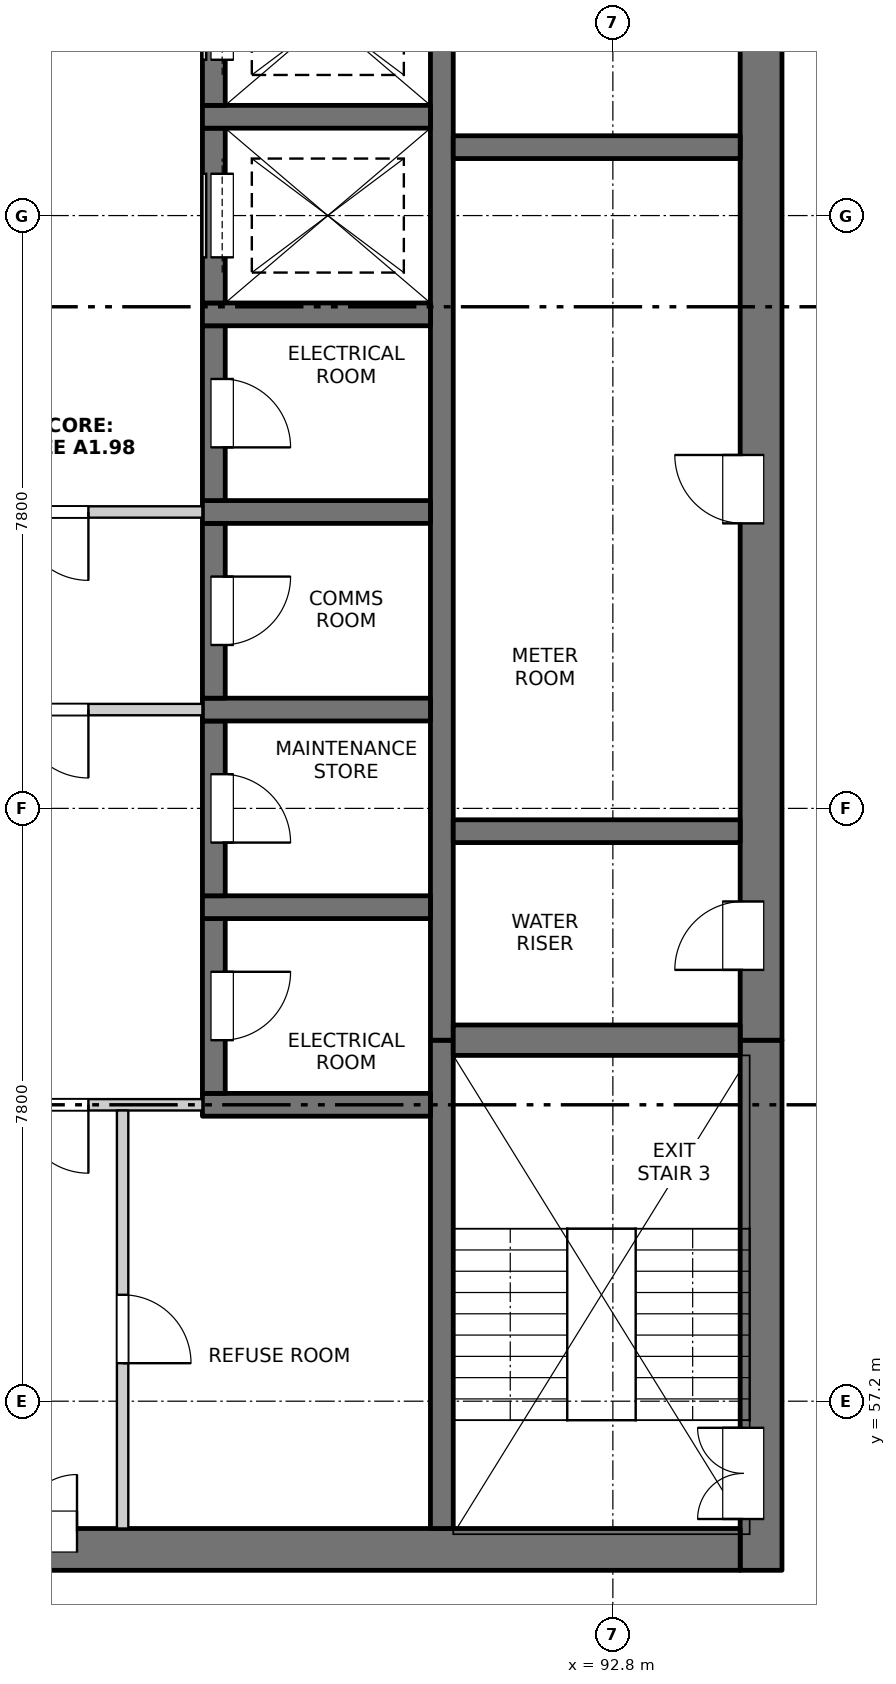
"""IFC4 building model, lengths in metres.
Left out: names, types, materials, properties, quantities, classifications, styles, units other than length and angle.
Written with IfcOpenShell. Run it as: python <this file> out.ifc"""

import sys

from ifc_helpers import new_model, si_unit, direction, frame, frame_2d, origin, place, context, subcontext, project, spatial, rectangle, extrude, element, fill, save


model = new_model("IFC4")
c1 = context("Model", 3, precision=1e-05, world=origin(), true_north=direction((0.0, 1.0)))
c2 = subcontext(c1, "Body", "Model", "MODEL_VIEW")
j1 = project(units=[si_unit("LENGTHUNIT", "METRE"), si_unit("PLANEANGLEUNIT", "RADIAN")], contexts=[c1])
p1 = place(None, origin())
s1 = spatial("IfcSite", under=j1, at=p1, CompositionType="ELEMENT")
p2 = place(p1, origin())
s2 = spatial("IfcBuilding", under=s1, at=p2, CompositionType="ELEMENT")
p3 = place(p2, frame((0.0, 0.0, 186.0)))
s3 = spatial("IfcBuildingStorey", under=s2, at=p3, CompositionType="ELEMENT", Elevation=186.0)
p4 = place(p3, frame((94.75, 54.975, -0.25), z_axis=(0.0, 0.0, 1.0), x_axis=(0.0, 1.0, 0.0)))
e1 = element("IfcWall", 1, at=p4, inside=s3, PredefinedType="SOLIDWALL", context=c2, shape_type="SweptSolid", body=[
    extrude(rectangle(XDim=6.975, YDim=0.55, at=frame_2d((3.487, 0.0))), origin(), (0.0, 0.0, 1.0), 3.4),
])
p5 = place(p4, frame((0.675, 0.0, 0.25)))
e2 = element("IfcOpeningElement", 2, at=p5, cuts=e1, PredefinedType="OPENING", context=c2, shape_type="SweptSolid", body=[
    extrude(rectangle(XDim=1.2, YDim=2.1, at=frame_2d((0.6, 1.05))), frame((0.0, 0.285, 0.0), z_axis=(0.0, -1.0, 0.0), x_axis=(1.0, 0.0, 0.0)), (0.0, 0.0, 1.0), 0.57),
])
p6 = place(p3, frame((94.75, 61.95, -0.25), z_axis=(0.0, 0.0, 1.0), x_axis=(0.0, 1.0, 0.0)))
e3 = element("IfcWall", 3, at=p6, inside=s3, PredefinedType="SOLIDWALL", context=c2, shape_type="SweptSolid", body=[
    extrude(rectangle(XDim=15.35, YDim=0.55, at=frame_2d((7.675, 0.0))), origin(), (0.0, 0.0, 1.0), 3.4),
])
p7 = place(p6, frame((0.925, 0.0, 0.25)))
e4 = element("IfcOpeningElement", 4, at=p7, cuts=e3, PredefinedType="OPENING", context=c2, shape_type="SweptSolid", body=[
    extrude(rectangle(XDim=0.9, YDim=2.1, at=frame_2d((0.45, 1.05))), frame((0.0, 0.285, 0.0), z_axis=(0.0, -1.0, 0.0), x_axis=(1.0, 0.0, 0.0)), (0.0, 0.0, 1.0), 0.57),
])
p8 = place(p6, frame((6.8, 0.0, 0.25)))
e5 = element("IfcOpeningElement", 5, at=p8, cuts=e3, PredefinedType="OPENING", context=c2, shape_type="SweptSolid", body=[
    extrude(rectangle(XDim=0.9, YDim=2.1, at=frame_2d((0.45, 1.05))), frame((0.0, 0.285, 0.0), z_axis=(0.0, -1.0, 0.0), x_axis=(1.0, 0.0, 0.0)), (0.0, 0.0, 1.0), 0.57),
])
p9 = place(p6, frame((13.1, 0.0, 0.25)))
e6 = element("IfcOpeningElement", 6, at=p9, cuts=e3, PredefinedType="OPENING", context=c2, shape_type="SweptSolid", body=[
    extrude(rectangle(XDim=0.9, YDim=2.1, at=frame_2d((0.45, 1.05))), frame((0.0, 0.285, 0.0), z_axis=(0.0, -1.0, 0.0), x_axis=(1.0, 0.0, 0.0)), (0.0, 0.0, 1.0), 0.57),
])
p10 = place(p3, frame((75.525, 55.25, -0.25), z_axis=(0.0, 0.0, 1.0), x_axis=(1.0, 0.0, 0.0)))
e7 = element("IfcWall", 7, at=p10, inside=s3, PredefinedType="SOLIDWALL", context=c2, shape_type="SweptSolid", body=[
    extrude(rectangle(XDim=18.95, YDim=0.55, at=frame_2d((9.475, 0.0))), origin(), (0.0, 0.0, 1.0), 3.4),
])
p11 = place(p10, frame((8.725, 0.0, 0.25)))
e8 = element("IfcOpeningElement", 8, at=p11, cuts=e7, PredefinedType="OPENING", context=c2, shape_type="SweptSolid", body=[
    extrude(rectangle(XDim=1.5, YDim=2.1, at=frame_2d((0.75, 1.05))), frame((0.0, 0.285, 0.0), z_axis=(0.0, -1.0, 0.0), x_axis=(1.0, 0.0, 0.0)), (0.0, 0.0, 1.0), 0.57),
])
p12 = place(p3, frame((90.55, 55.525, -0.25), z_axis=(0.0, 0.0, 1.0), x_axis=(0.0, 1.0, 0.0)))
e9 = element("IfcWall", 9, at=p12, inside=s3, PredefinedType="SOLIDWALL", context=c2, shape_type="SweptSolid", body=[
    extrude(rectangle(XDim=6.425, YDim=0.3, at=frame_2d((3.212, 0.0))), origin(), (0.0, 0.0, 1.0), 3.4),
])
p13 = place(p3, frame((90.55, 61.95, -0.25), z_axis=(0.0, 0.0, 1.0), x_axis=(0.0, 1.0, 0.0)))
e10 = element("IfcWall", 10, at=p13, inside=s3, PredefinedType="SOLIDWALL", context=c2, shape_type="SweptSolid", body=[
    extrude(rectangle(XDim=15.35, YDim=0.3, at=frame_2d((7.675, 0.0))), origin(), (0.0, 0.0, 1.0), 3.4),
])
p14 = place(p3, frame((87.4, 61.1, -0.25), z_axis=(0.0, 0.0, 1.0), x_axis=(1.0, 0.0, 0.0)))
e11 = element("IfcWall", 11, at=p14, inside=s3, PredefinedType="SOLIDWALL", context=c2, shape_type="SweptSolid", body=[
    extrude(rectangle(XDim=3.0, YDim=0.3, at=frame_2d((1.5, 0.0))), origin(), (0.0, 0.0, 1.0), 3.4),
])
p15 = place(p3, frame((87.55, 61.25, -0.25), z_axis=(0.0, 0.0, 1.0), x_axis=(0.0, 1.0, 0.0)))
e12 = element("IfcWall", 12, at=p15, inside=s3, PredefinedType="SOLIDWALL", context=c2, shape_type="SweptSolid", body=[
    extrude(rectangle(XDim=2.3, YDim=0.3, at=frame_2d((1.15, 0.0))), origin(), (0.0, 0.0, 1.0), 3.4),
])
p16 = place(p15, frame((0.7, 0.0, 0.25)))
e13 = element("IfcOpeningElement", 13, at=p16, cuts=e12, PredefinedType="OPENING", context=c2, shape_type="SweptSolid", body=[
    extrude(rectangle(XDim=0.9, YDim=2.1, at=frame_2d((0.45, 1.05))), frame((0.0, 0.16, 0.0), z_axis=(0.0, -1.0, 0.0), x_axis=(1.0, 0.0, 0.0)), (0.0, 0.0, 1.0), 0.32),
])
p17 = place(p3, frame((87.4, 63.7, -0.25), z_axis=(0.0, 0.0, 1.0), x_axis=(1.0, 0.0, 0.0)))
e14 = element("IfcWall", 14, at=p17, inside=s3, PredefinedType="SOLIDWALL", context=c2, shape_type="SweptSolid", body=[
    extrude(rectangle(XDim=3.0, YDim=0.3, at=frame_2d((1.5, 0.0))), origin(), (0.0, 0.0, 1.0), 3.4),
])
p18 = place(p3, frame((87.55, 63.85, -0.25), z_axis=(0.0, 0.0, 1.0), x_axis=(0.0, 1.0, 0.0)))
e15 = element("IfcWall", 15, at=p18, inside=s3, PredefinedType="SOLIDWALL", context=c2, shape_type="SweptSolid", body=[
    extrude(rectangle(XDim=2.3, YDim=0.3, at=frame_2d((1.15, 0.0))), origin(), (0.0, 0.0, 1.0), 3.4),
])
p19 = place(p18, frame((0.7, 0.0, 0.25)))
e16 = element("IfcOpeningElement", 16, at=p19, cuts=e15, PredefinedType="OPENING", context=c2, shape_type="SweptSolid", body=[
    extrude(rectangle(XDim=0.9, YDim=2.1, at=frame_2d((0.45, 1.05))), frame((0.0, 0.16, 0.0), z_axis=(0.0, -1.0, 0.0), x_axis=(1.0, 0.0, 0.0)), (0.0, 0.0, 1.0), 0.32),
])
p20 = place(p3, frame((87.4, 66.3, -0.25), z_axis=(0.0, 0.0, 1.0), x_axis=(1.0, 0.0, 0.0)))
e17 = element("IfcWall", 17, at=p20, inside=s3, PredefinedType="SOLIDWALL", context=c2, shape_type="SweptSolid", body=[
    extrude(rectangle(XDim=3.0, YDim=0.3, at=frame_2d((1.5, 0.0))), origin(), (0.0, 0.0, 1.0), 3.4),
])
p21 = place(p3, frame((87.55, 66.45, -0.25), z_axis=(0.0, 0.0, 1.0), x_axis=(0.0, 1.0, 0.0)))
e18 = element("IfcWall", 18, at=p21, inside=s3, PredefinedType="SOLIDWALL", context=c2, shape_type="SweptSolid", body=[
    extrude(rectangle(XDim=2.3, YDim=0.3, at=frame_2d((1.15, 0.0))), origin(), (0.0, 0.0, 1.0), 3.4),
])
p22 = place(p21, frame((0.7, 0.0, 0.25)))
e19 = element("IfcOpeningElement", 19, at=p22, cuts=e18, PredefinedType="OPENING", context=c2, shape_type="SweptSolid", body=[
    extrude(rectangle(XDim=0.9, YDim=2.1, at=frame_2d((0.45, 1.05))), frame((0.0, 0.16, 0.0), z_axis=(0.0, -1.0, 0.0), x_axis=(1.0, 0.0, 0.0)), (0.0, 0.0, 1.0), 0.32),
])
p23 = place(p3, frame((87.4, 68.9, -0.25), z_axis=(0.0, 0.0, 1.0), x_axis=(1.0, 0.0, 0.0)))
e20 = element("IfcWall", 20, at=p23, inside=s3, PredefinedType="SOLIDWALL", context=c2, shape_type="SweptSolid", body=[
    extrude(rectangle(XDim=3.0, YDim=0.3, at=frame_2d((1.5, 0.0))), origin(), (0.0, 0.0, 1.0), 3.4),
])
p24 = place(p3, frame((87.55, 69.05, -0.25), z_axis=(0.0, 0.0, 1.0), x_axis=(0.0, 1.0, 0.0)))
e21 = element("IfcWall", 21, at=p24, inside=s3, PredefinedType="SOLIDWALL", context=c2, shape_type="SweptSolid", body=[
    extrude(rectangle(XDim=2.3, YDim=0.3, at=frame_2d((1.15, 0.0))), origin(), (0.0, 0.0, 1.0), 3.4),
])
p25 = place(p24, frame((0.7, 0.0, 0.25)))
e22 = element("IfcOpeningElement", 22, at=p25, cuts=e21, PredefinedType="OPENING", context=c2, shape_type="SweptSolid", body=[
    extrude(rectangle(XDim=0.9, YDim=2.1, at=frame_2d((0.45, 1.05))), frame((0.0, 0.16, 0.0), z_axis=(0.0, -1.0, 0.0), x_axis=(1.0, 0.0, 0.0)), (0.0, 0.0, 1.0), 0.32),
])
p26 = place(p3, frame((87.4, 71.5, -0.25), z_axis=(0.0, 0.0, 1.0), x_axis=(1.0, 0.0, 0.0)))
e23 = element("IfcWall", 23, at=p26, inside=s3, PredefinedType="SOLIDWALL", context=c2, shape_type="SweptSolid", body=[
    extrude(rectangle(XDim=3.0, YDim=0.3, at=frame_2d((1.5, 0.0))), origin(), (0.0, 0.0, 1.0), 3.4),
])
p27 = place(p3, frame((87.55, 71.65, -0.25), z_axis=(0.0, 0.0, 1.0), x_axis=(0.0, 1.0, 0.0)))
e24 = element("IfcWall", 24, at=p27, inside=s3, PredefinedType="SOLIDWALL", context=c2, shape_type="SweptSolid", body=[
    extrude(rectangle(XDim=2.3, YDim=0.3, at=frame_2d((1.15, 0.0))), origin(), (0.0, 0.0, 1.0), 3.4),
])
p28 = place(p27, frame((0.6, 0.0, 0.25)))
e25 = element("IfcOpeningElement", 25, at=p28, cuts=e24, PredefinedType="OPENING", context=c2, shape_type="SweptSolid", body=[
    extrude(rectangle(XDim=1.1, YDim=2.1, at=frame_2d((0.55, 1.05))), frame((0.0, 0.16, 0.0), z_axis=(0.0, -1.0, 0.0), x_axis=(1.0, 0.0, 0.0)), (0.0, 0.0, 1.0), 0.32),
])
p29 = place(p3, frame((87.4, 74.1, -0.25), z_axis=(0.0, 0.0, 1.0), x_axis=(1.0, 0.0, 0.0)))
e26 = element("IfcWall", 26, at=p29, inside=s3, PredefinedType="SOLIDWALL", context=c2, shape_type="SweptSolid", body=[
    extrude(rectangle(XDim=3.0, YDim=0.3, at=frame_2d((1.5, 0.0))), origin(), (0.0, 0.0, 1.0), 3.4),
])
p30 = place(p3, frame((87.55, 74.25, -0.25), z_axis=(0.0, 0.0, 1.0), x_axis=(0.0, 1.0, 0.0)))
e27 = element("IfcWall", 27, at=p30, inside=s3, PredefinedType="SOLIDWALL", context=c2, shape_type="SweptSolid", body=[
    extrude(rectangle(XDim=2.3, YDim=0.3, at=frame_2d((1.15, 0.0))), origin(), (0.0, 0.0, 1.0), 3.4),
])
p31 = place(p30, frame((0.6, 0.0, 0.25)))
e28 = element("IfcOpeningElement", 28, at=p31, cuts=e27, PredefinedType="OPENING", context=c2, shape_type="SweptSolid", body=[
    extrude(rectangle(XDim=1.1, YDim=2.1, at=frame_2d((0.55, 1.05))), frame((0.0, 0.16, 0.0), z_axis=(0.0, -1.0, 0.0), x_axis=(1.0, 0.0, 0.0)), (0.0, 0.0, 1.0), 0.32),
])
p32 = place(p3, frame((90.7, 61.95, -0.25), z_axis=(0.0, 0.0, 1.0), x_axis=(1.0, 0.0, 0.0)))
e29 = element("IfcWall", 29, at=p32, inside=s3, PredefinedType="SOLIDWALL", context=c2, shape_type="SweptSolid", body=[
    extrude(rectangle(XDim=3.775, YDim=0.4, at=frame_2d((1.888, 0.0))), origin(), (0.0, 0.0, 1.0), 3.4),
])
for number, where, z_axis, x_axis in (
    (30, (90.7, 64.7, -0.25), (0.0, 0.0, 1.0), (1.0, 0.0, 0.0)),
    (31, (90.7, 73.7, -0.25), (0.0, 0.0, 1.0), (1.0, 0.0, 0.0)),
):
    element("IfcWall", number, at=place(p3, frame(where, z_axis=z_axis, x_axis=x_axis)), inside=s3, PredefinedType="SOLIDWALL", context=c2, shape_type="SweptSolid", body=[
        extrude(rectangle(XDim=3.775, YDim=0.3, at=frame_2d((1.888, 0.0))), origin(), (0.0, 0.0, 1.0), 3.4),
    ])
p33 = place(p3, frame((82.6, 61.1, 0.0), z_axis=(0.0, 0.0, 1.0), x_axis=(1.0, 0.0, 0.0)))
e32 = element("IfcWall", 32, at=p33, inside=s3, PredefinedType="PARTITIONING", context=c2, shape_type="SweptSolid", body=[
    extrude(rectangle(XDim=4.8, YDim=0.15, at=frame_2d((2.4, 0.0))), origin(), (0.0, 0.0, 1.0), 3.15),
])
p34 = place(p33, frame((1.5, 0.0, 0.0)))
e33 = element("IfcOpeningElement", 33, at=p34, cuts=e32, PredefinedType="OPENING", context=c2, shape_type="SweptSolid", body=[
    extrude(rectangle(XDim=1.8, YDim=2.1, at=frame_2d((0.9, 1.05))), frame((0.0, 0.085, 0.0), z_axis=(0.0, -1.0, 0.0), x_axis=(1.0, 0.0, 0.0)), (0.0, 0.0, 1.0), 0.17),
])
p35 = place(p3, frame((82.6, 66.3, 0.0), z_axis=(0.0, 0.0, 1.0), x_axis=(1.0, 0.0, 0.0)))
e34 = element("IfcWall", 34, at=p35, inside=s3, PredefinedType="PARTITIONING", context=c2, shape_type="SweptSolid", body=[
    extrude(rectangle(XDim=4.8, YDim=0.15, at=frame_2d((2.4, 0.0))), origin(), (0.0, 0.0, 1.0), 3.15),
])
p36 = place(p35, frame((1.5, 0.0, 0.0)))
e35 = element("IfcOpeningElement", 35, at=p36, cuts=e34, PredefinedType="OPENING", context=c2, shape_type="SweptSolid", body=[
    extrude(rectangle(XDim=1.8, YDim=2.1, at=frame_2d((0.9, 1.05))), frame((0.0, 0.085, 0.0), z_axis=(0.0, -1.0, 0.0), x_axis=(1.0, 0.0, 0.0)), (0.0, 0.0, 1.0), 0.17),
])
p37 = place(p3, frame((82.6, 68.9, 0.0), z_axis=(0.0, 0.0, 1.0), x_axis=(1.0, 0.0, 0.0)))
e36 = element("IfcWall", 36, at=p37, inside=s3, PredefinedType="PARTITIONING", context=c2, shape_type="SweptSolid", body=[
    extrude(rectangle(XDim=4.8, YDim=0.15, at=frame_2d((2.4, 0.0))), origin(), (0.0, 0.0, 1.0), 3.15),
])
p38 = place(p37, frame((1.5, 0.0, 0.0)))
e37 = element("IfcOpeningElement", 37, at=p38, cuts=e36, PredefinedType="OPENING", context=c2, shape_type="SweptSolid", body=[
    extrude(rectangle(XDim=1.8, YDim=2.1, at=frame_2d((0.9, 1.05))), frame((0.0, 0.085, 0.0), z_axis=(0.0, -1.0, 0.0), x_axis=(1.0, 0.0, 0.0)), (0.0, 0.0, 1.0), 0.17),
])
p39 = place(p3, frame((86.35, 55.525, 0.0), z_axis=(0.0, 0.0, 1.0), x_axis=(0.0, 1.0, 0.0)))
e38 = element("IfcWall", 38, at=p39, inside=s3, PredefinedType="PARTITIONING", context=c2, shape_type="SweptSolid", body=[
    extrude(rectangle(XDim=5.5, YDim=0.15, at=frame_2d((2.75, 0.0))), origin(), (0.0, 0.0, 1.0), 3.15),
])
p40 = place(p39, frame((2.175, 0.0, 0.0)))
e39 = element("IfcOpeningElement", 39, at=p40, cuts=e38, PredefinedType="OPENING", context=c2, shape_type="SweptSolid", body=[
    extrude(rectangle(XDim=0.9, YDim=2.1, at=frame_2d((0.45, 1.05))), frame((0.0, 0.085, 0.0), z_axis=(0.0, -1.0, 0.0), x_axis=(1.0, 0.0, 0.0)), (0.0, 0.0, 1.0), 0.17),
])
p41 = place(p11, origin())
e40 = element("IfcDoor", 40, at=p41, inside=s3, OperationType="DOUBLE_DOOR_SINGLE_SWING", PredefinedType="DOOR", context=c2, shape_type="SweptSolid", body=[
    extrude(rectangle(XDim=1.5, YDim=2.1, at=frame_2d((0.75, 1.05))), frame((0.0, 0.26, 0.0), z_axis=(0.0, -1.0, 0.0), x_axis=(1.0, 0.0, 0.0)), (0.0, 0.0, 1.0), 0.05),
])
fill(e8, e40)
p42 = place(p5, origin())
e41 = element("IfcDoor", 41, at=p42, inside=s3, OperationType="DOUBLE_DOOR_SINGLE_SWING", PredefinedType="DOOR", context=c2, shape_type="SweptSolid", body=[
    extrude(rectangle(XDim=1.2, YDim=2.1, at=frame_2d((0.6, 1.05))), frame((0.0, 0.26, 0.0), z_axis=(0.0, -1.0, 0.0), x_axis=(1.0, 0.0, 0.0)), (0.0, 0.0, 1.0), 0.05),
])
fill(e2, e41)
p43 = place(p40, origin())
e42 = element("IfcDoor", 42, at=p43, inside=s3, OperationType="SINGLE_SWING_RIGHT", PredefinedType="DOOR", context=c2, shape_type="SweptSolid", body=[
    extrude(rectangle(XDim=0.9, YDim=2.1, at=frame_2d((0.45, 1.05))), frame((0.0, 0.025, 0.0), z_axis=(0.0, -1.0, 0.0), x_axis=(1.0, 0.0, 0.0)), (0.0, 0.0, 1.0), 0.05),
])
fill(e39, e42)
p44 = place(p34, origin())
e43 = element("IfcDoor", 43, at=p44, inside=s3, OperationType="DOUBLE_DOOR_SINGLE_SWING", PredefinedType="DOOR", context=c2, shape_type="SweptSolid", body=[
    extrude(rectangle(XDim=1.8, YDim=2.1, at=frame_2d((0.9, 1.05))), frame((0.0, 0.025, 0.0), z_axis=(0.0, -1.0, 0.0), x_axis=(1.0, 0.0, 0.0)), (0.0, 0.0, 1.0), 0.05),
])
fill(e33, e43)
p45 = place(p16, origin())
e44 = element("IfcDoor", 44, at=p45, inside=s3, OperationType="SINGLE_SWING_LEFT", PredefinedType="DOOR", context=c2, shape_type="SweptSolid", body=[
    extrude(rectangle(XDim=0.9, YDim=2.1, at=frame_2d((0.45, 1.05))), frame((0.0, -0.085, 0.0), z_axis=(0.0, -1.0, 0.0), x_axis=(1.0, 0.0, 0.0)), (0.0, 0.0, 1.0), 0.05),
])
fill(e13, e44)
p46 = place(p7, origin())
e45 = element("IfcDoor", 45, at=p46, inside=s3, OperationType="SINGLE_SWING_LEFT", PredefinedType="DOOR", context=c2, shape_type="SweptSolid", body=[
    extrude(rectangle(XDim=0.9, YDim=2.1, at=frame_2d((0.45, 1.05))), frame((0.0, 0.26, 0.0), z_axis=(0.0, -1.0, 0.0), x_axis=(1.0, 0.0, 0.0)), (0.0, 0.0, 1.0), 0.05),
])
fill(e4, e45)
p47 = place(p19, origin())
e46 = element("IfcDoor", 46, at=p47, inside=s3, OperationType="SINGLE_SWING_RIGHT", PredefinedType="DOOR", context=c2, shape_type="SweptSolid", body=[
    extrude(rectangle(XDim=0.9, YDim=2.1, at=frame_2d((0.45, 1.05))), frame((0.0, -0.085, 0.0), z_axis=(0.0, -1.0, 0.0), x_axis=(1.0, 0.0, 0.0)), (0.0, 0.0, 1.0), 0.05),
])
fill(e16, e46)
p48 = place(p36, origin())
e47 = element("IfcDoor", 47, at=p48, inside=s3, OperationType="DOUBLE_DOOR_SINGLE_SWING", PredefinedType="DOOR", context=c2, shape_type="SweptSolid", body=[
    extrude(rectangle(XDim=1.8, YDim=2.1, at=frame_2d((0.9, 1.05))), frame((0.0, 0.025, 0.0), z_axis=(0.0, -1.0, 0.0), x_axis=(1.0, 0.0, 0.0)), (0.0, 0.0, 1.0), 0.05),
])
fill(e35, e47)
p49 = place(p22, origin())
e48 = element("IfcDoor", 48, at=p49, inside=s3, OperationType="SINGLE_SWING_LEFT", PredefinedType="DOOR", context=c2, shape_type="SweptSolid", body=[
    extrude(rectangle(XDim=0.9, YDim=2.1, at=frame_2d((0.45, 1.05))), frame((0.0, -0.085, 0.0), z_axis=(0.0, -1.0, 0.0), x_axis=(1.0, 0.0, 0.0)), (0.0, 0.0, 1.0), 0.05),
])
fill(e19, e48)
p50 = place(p38, origin())
e49 = element("IfcDoor", 49, at=p50, inside=s3, OperationType="DOUBLE_DOOR_SINGLE_SWING", PredefinedType="DOOR", context=c2, shape_type="SweptSolid", body=[
    extrude(rectangle(XDim=1.8, YDim=2.1, at=frame_2d((0.9, 1.05))), frame((0.0, 0.025, 0.0), z_axis=(0.0, -1.0, 0.0), x_axis=(1.0, 0.0, 0.0)), (0.0, 0.0, 1.0), 0.05),
])
fill(e37, e49)
p51 = place(p8, origin())
e50 = element("IfcDoor", 50, at=p51, inside=s3, OperationType="SINGLE_SWING_RIGHT", PredefinedType="DOOR", context=c2, shape_type="SweptSolid", body=[
    extrude(rectangle(XDim=0.9, YDim=2.1, at=frame_2d((0.45, 1.05))), frame((0.0, 0.26, 0.0), z_axis=(0.0, -1.0, 0.0), x_axis=(1.0, 0.0, 0.0)), (0.0, 0.0, 1.0), 0.05),
])
fill(e5, e50)
p52 = place(p25, origin())
e51 = element("IfcDoor", 51, at=p52, inside=s3, OperationType="SINGLE_SWING_RIGHT", PredefinedType="DOOR", context=c2, shape_type="SweptSolid", body=[
    extrude(rectangle(XDim=0.9, YDim=2.1, at=frame_2d((0.45, 1.05))), frame((0.0, -0.085, 0.0), z_axis=(0.0, -1.0, 0.0), x_axis=(1.0, 0.0, 0.0)), (0.0, 0.0, 1.0), 0.05),
])
fill(e22, e51)
p53 = place(p28, origin())
e52 = element("IfcDoor", 52, at=p53, inside=s3, OperationType="SLIDING_TO_LEFT", PredefinedType="DOOR", context=c2, shape_type="SweptSolid", body=[
    extrude(rectangle(XDim=1.1, YDim=2.1, at=frame_2d((0.55, 1.05))), frame((0.0, -0.085, 0.0), z_axis=(0.0, -1.0, 0.0), x_axis=(1.0, 0.0, 0.0)), (0.0, 0.0, 1.0), 0.05),
])
fill(e25, e52)
p54 = place(p31, origin())
e53 = element("IfcDoor", 53, at=p54, inside=s3, OperationType="SLIDING_TO_LEFT", PredefinedType="DOOR", context=c2, shape_type="SweptSolid", body=[
    extrude(rectangle(XDim=1.1, YDim=2.1, at=frame_2d((0.55, 1.05))), frame((0.0, -0.085, 0.0), z_axis=(0.0, -1.0, 0.0), x_axis=(1.0, 0.0, 0.0)), (0.0, 0.0, 1.0), 0.05),
])
fill(e28, e53)
save(model, sys.argv[1])
